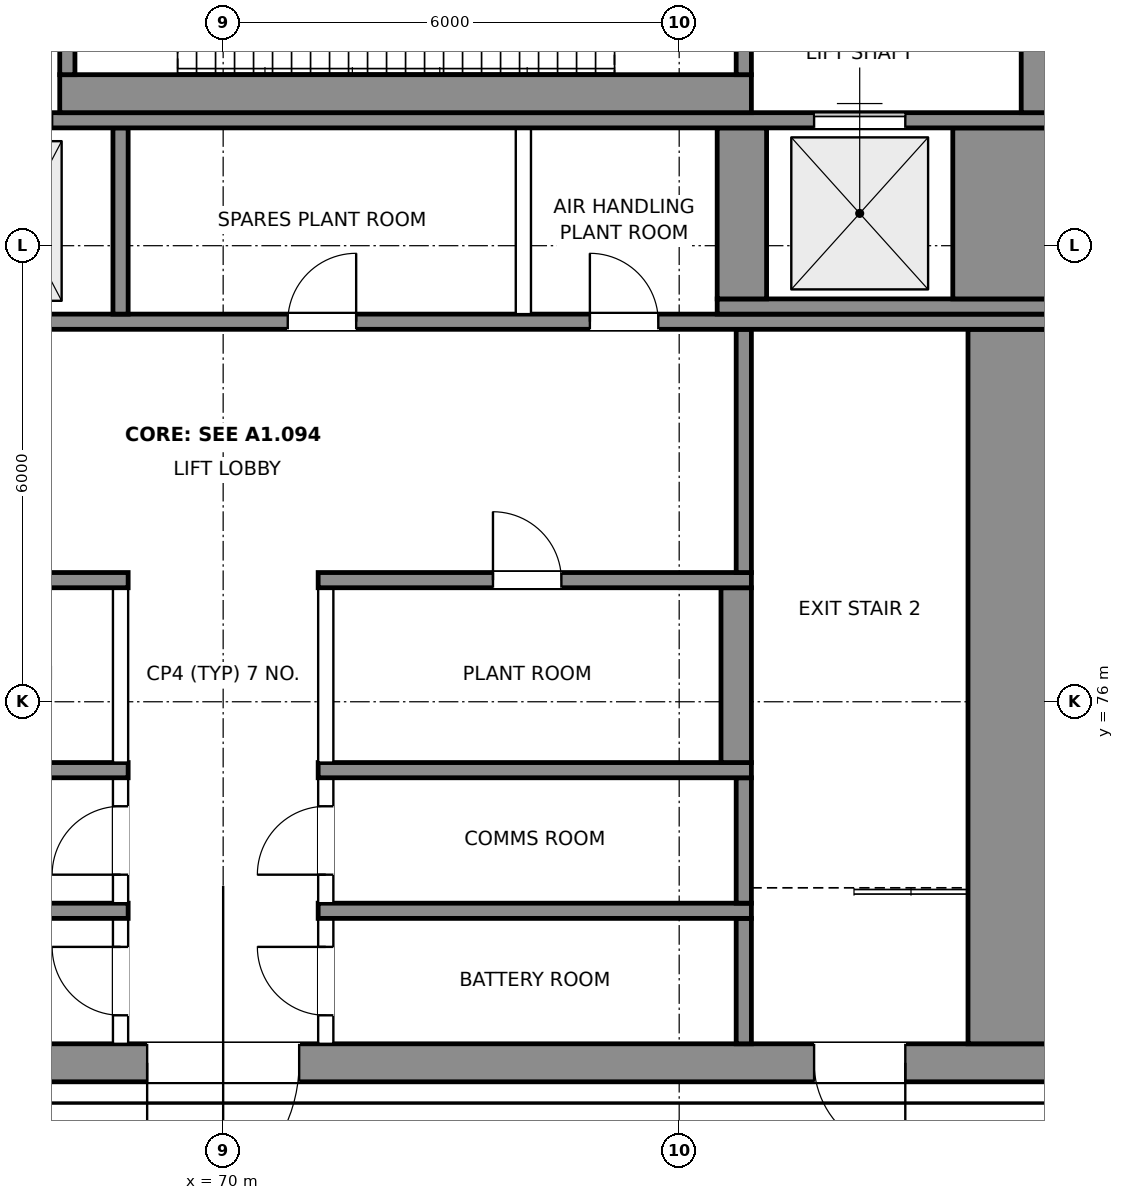
"""IFC4 building model, lengths in metres.
Left out: names, types, materials, properties, quantities, classifications, styles, units other than length and angle.
Written with IfcOpenShell. Run it as: python <this file> out.ifc"""

import sys

from ifc_helpers import new_model, si_unit, direction, frame, frame_2d, origin, place, context, subcontext, project, spatial, rectangle, extrude, element, fill, save


model = new_model("IFC4")
c1 = context("Model", 3, precision=1e-05, world=origin(), true_north=direction((0.0, 1.0)))
c2 = subcontext(c1, "Body", "Model", "MODEL_VIEW")
j1 = project(units=[si_unit("LENGTHUNIT", "METRE"), si_unit("PLANEANGLEUNIT", "RADIAN")], contexts=[c1])
p1 = place(None, origin())
s1 = spatial("IfcSite", under=j1, at=p1, CompositionType="ELEMENT")
p2 = place(p1, origin())
s2 = spatial("IfcBuilding", under=s1, at=p2, CompositionType="ELEMENT")
p3 = place(p2, frame((0.0, 0.0, 342.2)))
s3 = spatial("IfcBuildingStorey", under=s2, at=p3, CompositionType="ELEMENT", Elevation=342.2)
p4 = place(p3, frame((59.0, 71.25, 0.0), z_axis=(0.0, 0.0, 1.0), x_axis=(1.0, 0.0, 0.0)))
e1 = element("IfcWall", 1, at=p4, inside=s3, PredefinedType="SHEAR", context=c2, shape_type="SweptSolid", body=[
    extrude(rectangle(XDim=22.0, YDim=0.5, at=frame_2d((11.0, 0.0))), origin(), (0.0, 0.0, 1.0), 4.5),
])
p5 = place(p4, frame((2.025, 0.0, 0.0)))
e2 = element("IfcOpeningElement", 2, at=p5, cuts=e1, PredefinedType="OPENING", context=c2, shape_type="SweptSolid", body=[
    extrude(rectangle(XDim=1.2, YDim=2.1, at=frame_2d((0.6, 1.05))), frame((0.0, 0.26, 0.0), z_axis=(0.0, -1.0, 0.0), x_axis=(1.0, 0.0, 0.0)), (0.0, 0.0, 1.0), 0.52),
])
p6 = place(p4, frame((18.775, 0.0, 0.0)))
e3 = element("IfcOpeningElement", 3, at=p6, cuts=e1, PredefinedType="OPENING", context=c2, shape_type="SweptSolid", body=[
    extrude(rectangle(XDim=1.2, YDim=2.1, at=frame_2d((0.6, 1.05))), frame((0.0, 0.26, 0.0), z_axis=(0.0, -1.0, 0.0), x_axis=(1.0, 0.0, 0.0)), (0.0, 0.0, 1.0), 0.52),
])
p7 = place(p4, frame((10.0, 0.0, 0.0)))
e4 = element("IfcOpeningElement", 4, at=p7, cuts=e1, PredefinedType="OPENING", context=c2, shape_type="SweptSolid", body=[
    extrude(rectangle(XDim=2.0, YDim=2.1, at=frame_2d((1.0, 1.05))), frame((0.0, 0.26, 0.0), z_axis=(0.0, -1.0, 0.0), x_axis=(1.0, 0.0, 0.0)), (0.0, 0.0, 1.0), 0.52),
])
p8 = place(p3, frame((68.65, 71.5, 0.0), z_axis=(0.0, 0.0, 1.0), x_axis=(0.0, 1.0, 0.0)))
e5 = element("IfcWall", 5, at=p8, inside=s3, PredefinedType="PARTITIONING", context=c2, shape_type="SweptSolid", body=[
    extrude(rectangle(XDim=1.65, YDim=0.2, at=frame_2d((0.825, 0.0))), origin(), (0.0, 0.0, 1.0), 4.2),
])
p9 = place(p8, frame((0.375, 0.0, 0.0)))
e6 = element("IfcOpeningElement", 6, at=p9, cuts=e5, PredefinedType="OPENING", context=c2, shape_type="SweptSolid", body=[
    extrude(rectangle(XDim=0.9, YDim=2.1, at=frame_2d((0.45, 1.05))), frame((0.0, 0.11, 0.0), z_axis=(0.0, -1.0, 0.0), x_axis=(1.0, 0.0, 0.0)), (0.0, 0.0, 1.0), 0.22),
])
p10 = place(p3, frame((71.35, 71.5, 0.0), z_axis=(0.0, 0.0, 1.0), x_axis=(0.0, 1.0, 0.0)))
e7 = element("IfcWall", 7, at=p10, inside=s3, PredefinedType="PARTITIONING", context=c2, shape_type="SweptSolid", body=[
    extrude(rectangle(XDim=1.65, YDim=0.2, at=frame_2d((0.825, 0.0))), origin(), (0.0, 0.0, 1.0), 4.2),
])
p11 = place(p10, frame((0.375, 0.0, 0.0)))
e8 = element("IfcOpeningElement", 8, at=p11, cuts=e7, PredefinedType="OPENING", context=c2, shape_type="SweptSolid", body=[
    extrude(rectangle(XDim=0.9, YDim=2.1, at=frame_2d((0.45, 1.05))), frame((0.0, 0.11, 0.0), z_axis=(0.0, -1.0, 0.0), x_axis=(1.0, 0.0, 0.0)), (0.0, 0.0, 1.0), 0.22),
])
p12 = place(p3, frame((76.85, 71.5, 0.0), z_axis=(0.0, 0.0, 1.0), x_axis=(0.0, 1.0, 0.0)))
e9 = element("IfcWall", 9, at=p12, inside=s3, PredefinedType="SHEAR", context=c2, shape_type="SweptSolid", body=[
    extrude(rectangle(XDim=1.65, YDim=0.2, at=frame_2d((0.825, 0.0))), origin(), (0.0, 0.0, 1.0), 4.5),
])
p13 = place(p3, frame((80.4, 71.5, 0.0), z_axis=(0.0, 0.0, 1.0), x_axis=(0.0, 1.0, 0.0)))
e10 = element("IfcWall", 10, at=p13, inside=s3, PredefinedType="SHEAR", context=c2, shape_type="SweptSolid", body=[
    extrude(rectangle(XDim=9.4, YDim=1.2, at=frame_2d((4.7, 0.0))), origin(), (0.0, 0.0, 1.0), 4.5),
])
for number, where, z_axis, x_axis in (
    (11, (63.05, 73.25, 0.0), (0.0, 0.0, 1.0), (1.0, 0.0, 0.0)),
    (12, (71.25, 73.25, 0.0), (0.0, 0.0, 1.0), (1.0, 0.0, 0.0)),
):
    element("IfcWall", number, at=place(p3, frame(where, z_axis=z_axis, x_axis=x_axis)), inside=s3, PredefinedType="SHEAR", context=c2, shape_type="SweptSolid", body=[
        extrude(rectangle(XDim=5.7, YDim=0.2, at=frame_2d((2.85, 0.0))), origin(), (0.0, 0.0, 1.0), 4.5),
    ])
p14 = place(p3, frame((68.65, 73.35, 0.0), z_axis=(0.0, 0.0, 1.0), x_axis=(0.0, 1.0, 0.0)))
e13 = element("IfcWall", 13, at=p14, inside=s3, PredefinedType="PARTITIONING", context=c2, shape_type="SweptSolid", body=[
    extrude(rectangle(XDim=1.65, YDim=0.2, at=frame_2d((0.825, 0.0))), origin(), (0.0, 0.0, 1.0), 4.2),
])
p15 = place(p14, frame((0.375, 0.0, 0.0)))
e14 = element("IfcOpeningElement", 14, at=p15, cuts=e13, PredefinedType="OPENING", context=c2, shape_type="SweptSolid", body=[
    extrude(rectangle(XDim=0.9, YDim=2.1, at=frame_2d((0.45, 1.05))), frame((0.0, 0.11, 0.0), z_axis=(0.0, -1.0, 0.0), x_axis=(1.0, 0.0, 0.0)), (0.0, 0.0, 1.0), 0.22),
])
p16 = place(p3, frame((71.35, 73.35, 0.0), z_axis=(0.0, 0.0, 1.0), x_axis=(0.0, 1.0, 0.0)))
e15 = element("IfcWall", 15, at=p16, inside=s3, PredefinedType="PARTITIONING", context=c2, shape_type="SweptSolid", body=[
    extrude(rectangle(XDim=1.65, YDim=0.2, at=frame_2d((0.825, 0.0))), origin(), (0.0, 0.0, 1.0), 4.2),
])
p17 = place(p16, frame((0.375, 0.0, 0.0)))
e16 = element("IfcOpeningElement", 16, at=p17, cuts=e15, PredefinedType="OPENING", context=c2, shape_type="SweptSolid", body=[
    extrude(rectangle(XDim=0.9, YDim=2.1, at=frame_2d((0.45, 1.05))), frame((0.0, 0.11, 0.0), z_axis=(0.0, -1.0, 0.0), x_axis=(1.0, 0.0, 0.0)), (0.0, 0.0, 1.0), 0.22),
])
p18 = place(p3, frame((76.85, 73.35, 0.0), z_axis=(0.0, 0.0, 1.0), x_axis=(0.0, 1.0, 0.0)))
e17 = element("IfcWall", 17, at=p18, inside=s3, PredefinedType="SHEAR", context=c2, shape_type="SweptSolid", body=[
    extrude(rectangle(XDim=1.65, YDim=0.2, at=frame_2d((0.825, 0.0))), origin(), (0.0, 0.0, 1.0), 4.5),
])
for number, where, z_axis, x_axis in (
    (18, (63.05, 75.1, 0.0), (0.0, 0.0, 1.0), (1.0, 0.0, 0.0)),
    (19, (71.25, 75.1, 0.0), (0.0, 0.0, 1.0), (1.0, 0.0, 0.0)),
):
    element("IfcWall", number, at=place(p3, frame(where, z_axis=z_axis, x_axis=x_axis)), inside=s3, PredefinedType="SHEAR", context=c2, shape_type="SweptSolid", body=[
        extrude(rectangle(XDim=5.7, YDim=0.2, at=frame_2d((2.85, 0.0))), origin(), (0.0, 0.0, 1.0), 4.5),
    ])
for number, where, z_axis, x_axis in (
    (20, (68.65, 75.2, 0.0), (0.0, 0.0, 1.0), (0.0, 1.0, 0.0)),
    (21, (71.35, 75.2, 0.0), (0.0, 0.0, 1.0), (0.0, 1.0, 0.0)),
):
    element("IfcWall", number, at=place(p3, frame(where, z_axis=z_axis, x_axis=x_axis)), inside=s3, PredefinedType="PARTITIONING", context=c2, shape_type="SweptSolid", body=[
        extrude(rectangle(XDim=2.3, YDim=0.2, at=frame_2d((1.15, 0.0))), origin(), (0.0, 0.0, 1.0), 4.2),
    ])
p19 = place(p3, frame((76.75, 75.2, 0.0), z_axis=(0.0, 0.0, 1.0), x_axis=(0.0, 1.0, 0.0)))
e22 = element("IfcWall", 22, at=p19, inside=s3, PredefinedType="SHEAR", context=c2, shape_type="SweptSolid", body=[
    extrude(rectangle(XDim=2.3, YDim=0.4, at=frame_2d((1.15, 0.0))), origin(), (0.0, 0.0, 1.0), 4.5),
])
p20 = place(p3, frame((63.05, 77.6, 0.0), z_axis=(0.0, 0.0, 1.0), x_axis=(1.0, 0.0, 0.0)))
e23 = element("IfcWall", 23, at=p20, inside=s3, PredefinedType="SHEAR", context=c2, shape_type="SweptSolid", body=[
    extrude(rectangle(XDim=5.7, YDim=0.2, at=frame_2d((2.85, 0.0))), origin(), (0.0, 0.0, 1.0), 4.5),
])
p21 = place(p20, frame((2.5, 0.0, 0.0)))
e24 = element("IfcOpeningElement", 24, at=p21, cuts=e23, PredefinedType="OPENING", context=c2, shape_type="SweptSolid", body=[
    extrude(rectangle(XDim=0.9, YDim=2.1, at=frame_2d((0.45, 1.05))), frame((0.0, 0.11, 0.0), z_axis=(0.0, -1.0, 0.0), x_axis=(1.0, 0.0, 0.0)), (0.0, 0.0, 1.0), 0.22),
])
p22 = place(p3, frame((71.25, 77.6, 0.0), z_axis=(0.0, 0.0, 1.0), x_axis=(1.0, 0.0, 0.0)))
e25 = element("IfcWall", 25, at=p22, inside=s3, PredefinedType="SHEAR", context=c2, shape_type="SweptSolid", body=[
    extrude(rectangle(XDim=5.7, YDim=0.2, at=frame_2d((2.85, 0.0))), origin(), (0.0, 0.0, 1.0), 4.5),
])
p23 = place(p22, frame((2.3, 0.0, 0.0)))
e26 = element("IfcOpeningElement", 26, at=p23, cuts=e25, PredefinedType="OPENING", context=c2, shape_type="SweptSolid", body=[
    extrude(rectangle(XDim=0.9, YDim=2.1, at=frame_2d((0.45, 1.05))), frame((0.0, 0.11, 0.0), z_axis=(0.0, -1.0, 0.0), x_axis=(1.0, 0.0, 0.0)), (0.0, 0.0, 1.0), 0.22),
])
p24 = place(p3, frame((76.85, 77.7, 0.0), z_axis=(0.0, 0.0, 1.0), x_axis=(0.0, 1.0, 0.0)))
e27 = element("IfcWall", 27, at=p24, inside=s3, PredefinedType="SHEAR", context=c2, shape_type="SweptSolid", body=[
    extrude(rectangle(XDim=3.2, YDim=0.2, at=frame_2d((1.6, 0.0))), origin(), (0.0, 0.0, 1.0), 4.5),
])
p25 = place(p3, frame((59.0, 81.0, 0.0), z_axis=(0.0, 0.0, 1.0), x_axis=(1.0, 0.0, 0.0)))
e28 = element("IfcWall", 28, at=p25, inside=s3, PredefinedType="SHEAR", context=c2, shape_type="SweptSolid", body=[
    extrude(rectangle(XDim=22.0, YDim=0.2, at=frame_2d((11.0, 0.0))), origin(), (0.0, 0.0, 1.0), 4.5),
])
p26 = place(p25, frame((11.85, 0.0, 0.0)))
e29 = element("IfcOpeningElement", 29, at=p26, cuts=e28, PredefinedType="OPENING", context=c2, shape_type="SweptSolid", body=[
    extrude(rectangle(XDim=0.9, YDim=2.1, at=frame_2d((0.45, 1.05))), frame((0.0, 0.11, 0.0), z_axis=(0.0, -1.0, 0.0), x_axis=(1.0, 0.0, 0.0)), (0.0, 0.0, 1.0), 0.22),
])
p27 = place(p25, frame((15.825, 0.0, 0.0)))
e30 = element("IfcOpeningElement", 30, at=p27, cuts=e28, PredefinedType="OPENING", context=c2, shape_type="SweptSolid", body=[
    extrude(rectangle(XDim=0.9, YDim=2.1, at=frame_2d((0.45, 1.05))), frame((0.0, 0.11, 0.0), z_axis=(0.0, -1.0, 0.0), x_axis=(1.0, 0.0, 0.0)), (0.0, 0.0, 1.0), 0.22),
])
p28 = place(p3, frame((68.65, 81.1, 0.0), z_axis=(0.0, 0.0, 1.0), x_axis=(0.0, 1.0, 0.0)))
e31 = element("IfcWall", 31, at=p28, inside=s3, PredefinedType="SHEAR", context=c2, shape_type="SweptSolid", body=[
    extrude(rectangle(XDim=2.45, YDim=0.2, at=frame_2d((1.225, 0.0))), origin(), (0.0, 0.0, 1.0), 4.5),
])
p29 = place(p3, frame((73.95, 81.1, 0.0), z_axis=(0.0, 0.0, 1.0), x_axis=(0.0, 1.0, 0.0)))
e32 = element("IfcWall", 32, at=p29, inside=s3, PredefinedType="PARTITIONING", context=c2, shape_type="SweptSolid", body=[
    extrude(rectangle(XDim=2.45, YDim=0.2, at=frame_2d((1.225, 0.0))), origin(), (0.0, 0.0, 1.0), 4.2),
])
p30 = place(p3, frame((76.5, 81.2, 0.0), z_axis=(0.0, 0.0, 1.0), x_axis=(1.0, 0.0, 0.0)))
e33 = element("IfcWall", 33, at=p30, inside=s3, PredefinedType="SHEAR", context=c2, shape_type="SweptSolid", body=[
    extrude(rectangle(XDim=4.5, YDim=0.2, at=frame_2d((2.25, 0.0))), origin(), (0.0, 0.0, 1.0), 4.5),
])
p31 = place(p3, frame((76.825, 81.3, 0.0), z_axis=(0.0, 0.0, 1.0), x_axis=(0.0, 1.0, 0.0)))
e34 = element("IfcWall", 34, at=p31, inside=s3, PredefinedType="SHEAR", context=c2, shape_type="SweptSolid", body=[
    extrude(rectangle(XDim=2.25, YDim=0.65, at=frame_2d((1.125, 0.0))), origin(), (0.0, 0.0, 1.0), 4.5),
])
p32 = place(p3, frame((80.3, 81.3, 0.0), z_axis=(0.0, 0.0, 1.0), x_axis=(0.0, 1.0, 0.0)))
e35 = element("IfcWall", 35, at=p32, inside=s3, PredefinedType="SHEAR", context=c2, shape_type="SweptSolid", body=[
    extrude(rectangle(XDim=2.25, YDim=1.4, at=frame_2d((1.125, 0.0))), origin(), (0.0, 0.0, 1.0), 4.5),
])
p33 = place(p3, frame((59.0, 83.65, 0.0), z_axis=(0.0, 0.0, 1.0), x_axis=(1.0, 0.0, 0.0)))
e36 = element("IfcWall", 36, at=p33, inside=s3, PredefinedType="SHEAR", context=c2, shape_type="SweptSolid", body=[
    extrude(rectangle(XDim=22.0, YDim=0.2, at=frame_2d((11.0, 0.0))), origin(), (0.0, 0.0, 1.0), 4.5),
])
p34 = place(p33, frame((5.125, 0.0, 0.0)))
e37 = element("IfcOpeningElement", 37, at=p34, cuts=e36, PredefinedType="OPENING", context=c2, shape_type="SweptSolid", body=[
    extrude(rectangle(XDim=1.1, YDim=2.1, at=frame_2d((0.55, 1.05))), frame((0.0, 0.11, 0.0), z_axis=(0.0, -1.0, 0.0), x_axis=(1.0, 0.0, 0.0)), (0.0, 0.0, 1.0), 0.22),
])
p35 = place(p33, frame((7.65, 0.0, 0.0)))
e38 = element("IfcOpeningElement", 38, at=p35, cuts=e36, PredefinedType="OPENING", context=c2, shape_type="SweptSolid", body=[
    extrude(rectangle(XDim=1.1, YDim=2.1, at=frame_2d((0.55, 1.05))), frame((0.0, 0.11, 0.0), z_axis=(0.0, -1.0, 0.0), x_axis=(1.0, 0.0, 0.0)), (0.0, 0.0, 1.0), 0.22),
])
p36 = place(p33, frame((18.775, 0.0, 0.0)))
e39 = element("IfcOpeningElement", 39, at=p36, cuts=e36, PredefinedType="OPENING", context=c2, shape_type="SweptSolid", body=[
    extrude(rectangle(XDim=1.2, YDim=2.1, at=frame_2d((0.6, 1.05))), frame((0.0, 0.11, 0.0), z_axis=(0.0, -1.0, 0.0), x_axis=(1.0, 0.0, 0.0)), (0.0, 0.0, 1.0), 0.22),
])
p37 = place(p33, frame((2.075, 0.0, 0.0)))
e40 = element("IfcOpeningElement", 40, at=p37, cuts=e36, PredefinedType="OPENING", context=c2, shape_type="SweptSolid", body=[
    extrude(rectangle(XDim=1.1, YDim=2.1, at=frame_2d((0.55, 1.05))), frame((0.0, 0.11, 0.0), z_axis=(0.0, -1.0, 0.0), x_axis=(1.0, 0.0, 0.0)), (0.0, 0.0, 1.0), 0.22),
])
p38 = place(p3, frame((67.85, 84.0, 0.0), z_axis=(0.0, 0.0, 1.0), x_axis=(1.0, 0.0, 0.0)))
e41 = element("IfcWall", 41, at=p38, inside=s3, PredefinedType="SHEAR", context=c2, shape_type="SweptSolid", body=[
    extrude(rectangle(XDim=9.1, YDim=0.5, at=frame_2d((4.55, 0.0))), origin(), (0.0, 0.0, 1.0), 4.5),
])
p39 = place(p3, frame((80.75, 83.75, 0.0), z_axis=(0.0, 0.0, 1.0), x_axis=(0.0, 1.0, 0.0)))
e42 = element("IfcWall", 42, at=p39, inside=s3, PredefinedType="SHEAR", context=c2, shape_type="SweptSolid", body=[
    extrude(rectangle(XDim=3.75, YDim=0.5, at=frame_2d((1.875, 0.0))), origin(), (0.0, 0.0, 1.0), 4.5),
])
p40 = place(p39, frame((1.275, 0.0, 0.0)))
e43 = element("IfcOpeningElement", 43, at=p40, cuts=e42, PredefinedType="OPENING", context=c2, shape_type="SweptSolid", body=[
    extrude(rectangle(XDim=1.2, YDim=2.1, at=frame_2d((0.6, 1.05))), frame((0.0, 0.26, 0.0), z_axis=(0.0, -1.0, 0.0), x_axis=(1.0, 0.0, 0.0)), (0.0, 0.0, 1.0), 0.52),
])
p41 = place(p3, frame((67.95, 84.25, 0.0), z_axis=(0.0, 0.0, 1.0), x_axis=(0.0, 1.0, 0.0)))
e44 = element("IfcWall", 44, at=p41, inside=s3, PredefinedType="SHEAR", context=c2, shape_type="SweptSolid", body=[
    extrude(rectangle(XDim=2.85, YDim=0.2, at=frame_2d((1.425, 0.0))), origin(), (0.0, 0.0, 1.0), 4.5),
])
p42 = place(p41, frame((0.825, 0.0, 0.0)))
e45 = element("IfcOpeningElement", 45, at=p42, cuts=e44, PredefinedType="OPENING", context=c2, shape_type="SweptSolid", body=[
    extrude(rectangle(XDim=1.2, YDim=2.1, at=frame_2d((0.6, 1.05))), frame((0.0, 0.11, 0.0), z_axis=(0.0, -1.0, 0.0), x_axis=(1.0, 0.0, 0.0)), (0.0, 0.0, 1.0), 0.22),
])
p43 = place(p3, frame((76.85, 84.25, 0.0), z_axis=(0.0, 0.0, 1.0), x_axis=(0.0, 1.0, 0.0)))
e46 = element("IfcWall", 46, at=p43, inside=s3, PredefinedType="SHEAR", context=c2, shape_type="SweptSolid", body=[
    extrude(rectangle(XDim=2.85, YDim=0.2, at=frame_2d((1.425, 0.0))), origin(), (0.0, 0.0, 1.0), 4.5),
])
p44 = place(p43, frame((1.575, 0.0, 0.0)))
e47 = element("IfcOpeningElement", 47, at=p44, cuts=e46, PredefinedType="OPENING", context=c2, shape_type="SweptSolid", body=[
    extrude(rectangle(XDim=1.2, YDim=2.1, at=frame_2d((0.6, 1.05))), frame((0.0, 0.11, 0.0), z_axis=(0.0, -1.0, 0.0), x_axis=(1.0, 0.0, 0.0)), (0.0, 0.0, 1.0), 0.22),
])
p45 = place(p6, frame((1.2, 0.0, 0.0), z_axis=(0.0, 0.0, 1.0), x_axis=(-1.0, 0.0, 0.0)))
e48 = element("IfcDoor", 48, at=p45, inside=s3, OperationType="SINGLE_SWING_LEFT", PredefinedType="DOOR", context=c2, shape_type="SweptSolid", body=[
    extrude(rectangle(XDim=1.2, YDim=2.1, at=frame_2d((0.6, 1.05))), frame((0.0, 0.025, 0.0), z_axis=(0.0, -1.0, 0.0), x_axis=(1.0, 0.0, 0.0)), (0.0, 0.0, 1.0), 0.05),
])
fill(e3, e48)
p46 = place(p7, frame((2.0, 0.0, 0.0), z_axis=(0.0, 0.0, 1.0), x_axis=(-1.0, 0.0, 0.0)))
e49 = element("IfcDoor", 49, at=p46, inside=s3, OperationType="DOUBLE_DOOR_SINGLE_SWING", PredefinedType="DOOR", context=c2, shape_type="SweptSolid", body=[
    extrude(rectangle(XDim=2.0, YDim=2.1, at=frame_2d((1.0, 1.05))), frame((0.0, 0.025, 0.0), z_axis=(0.0, -1.0, 0.0), x_axis=(1.0, 0.0, 0.0)), (0.0, 0.0, 1.0), 0.05),
])
fill(e4, e49)
p47 = place(p9, origin())
e50 = element("IfcDoor", 50, at=p47, inside=s3, OperationType="SINGLE_SWING_RIGHT", PredefinedType="DOOR", context=c2, shape_type="SweptSolid", body=[
    extrude(rectangle(XDim=0.9, YDim=2.1, at=frame_2d((0.45, 1.05))), frame((0.0, 0.025, 0.0), z_axis=(0.0, -1.0, 0.0), x_axis=(1.0, 0.0, 0.0)), (0.0, 0.0, 1.0), 0.05),
])
fill(e6, e50)
p48 = place(p15, origin())
e51 = element("IfcDoor", 51, at=p48, inside=s3, OperationType="SINGLE_SWING_LEFT", PredefinedType="DOOR", context=c2, shape_type="SweptSolid", body=[
    extrude(rectangle(XDim=0.9, YDim=2.1, at=frame_2d((0.45, 1.05))), frame((0.0, 0.025, 0.0), z_axis=(0.0, -1.0, 0.0), x_axis=(1.0, 0.0, 0.0)), (0.0, 0.0, 1.0), 0.05),
])
fill(e14, e51)
p49 = place(p11, origin())
e52 = element("IfcDoor", 52, at=p49, inside=s3, OperationType="SINGLE_SWING_RIGHT", PredefinedType="DOOR", context=c2, shape_type="SweptSolid", body=[
    extrude(rectangle(XDim=0.9, YDim=2.1, at=frame_2d((0.45, 1.05))), frame((0.0, 0.025, 0.0), z_axis=(0.0, -1.0, 0.0), x_axis=(1.0, 0.0, 0.0)), (0.0, 0.0, 1.0), 0.05),
])
fill(e8, e52)
p50 = place(p17, origin())
e53 = element("IfcDoor", 53, at=p50, inside=s3, OperationType="SINGLE_SWING_LEFT", PredefinedType="DOOR", context=c2, shape_type="SweptSolid", body=[
    extrude(rectangle(XDim=0.9, YDim=2.1, at=frame_2d((0.45, 1.05))), frame((0.0, 0.025, 0.0), z_axis=(0.0, -1.0, 0.0), x_axis=(1.0, 0.0, 0.0)), (0.0, 0.0, 1.0), 0.05),
])
fill(e16, e53)
p51 = place(p36, origin())
e54 = element("IfcDoor", 54, at=p51, inside=s3, OperationType="DOUBLE_DOOR_SLIDING", PredefinedType="DOOR", context=c2, shape_type="SweptSolid", body=[
    extrude(rectangle(XDim=1.2, YDim=2.1, at=frame_2d((0.6, 1.05))), frame((0.0, 0.025, 0.0), z_axis=(0.0, -1.0, 0.0), x_axis=(1.0, 0.0, 0.0)), (0.0, 0.0, 1.0), 0.05),
])
fill(e39, e54)
p52 = place(p23, origin())
e55 = element("IfcDoor", 55, at=p52, inside=s3, OperationType="SINGLE_SWING_LEFT", PredefinedType="DOOR", context=c2, shape_type="SweptSolid", body=[
    extrude(rectangle(XDim=0.9, YDim=2.1, at=frame_2d((0.45, 1.05))), frame((0.0, 0.025, 0.0), z_axis=(0.0, -1.0, 0.0), x_axis=(1.0, 0.0, 0.0)), (0.0, 0.0, 1.0), 0.05),
])
fill(e26, e55)
p53 = place(p26, origin())
e56 = element("IfcDoor", 56, at=p53, inside=s3, OperationType="SINGLE_SWING_RIGHT", PredefinedType="DOOR", context=c2, shape_type="SweptSolid", body=[
    extrude(rectangle(XDim=0.9, YDim=2.1, at=frame_2d((0.45, 1.05))), frame((0.0, 0.025, 0.0), z_axis=(0.0, -1.0, 0.0), x_axis=(1.0, 0.0, 0.0)), (0.0, 0.0, 1.0), 0.05),
])
fill(e29, e56)
p54 = place(p27, origin())
e57 = element("IfcDoor", 57, at=p54, inside=s3, OperationType="SINGLE_SWING_LEFT", PredefinedType="DOOR", context=c2, shape_type="SweptSolid", body=[
    extrude(rectangle(XDim=0.9, YDim=2.1, at=frame_2d((0.45, 1.05))), frame((0.0, 0.025, 0.0), z_axis=(0.0, -1.0, 0.0), x_axis=(1.0, 0.0, 0.0)), (0.0, 0.0, 1.0), 0.05),
])
fill(e30, e57)
save(model, sys.argv[1])
